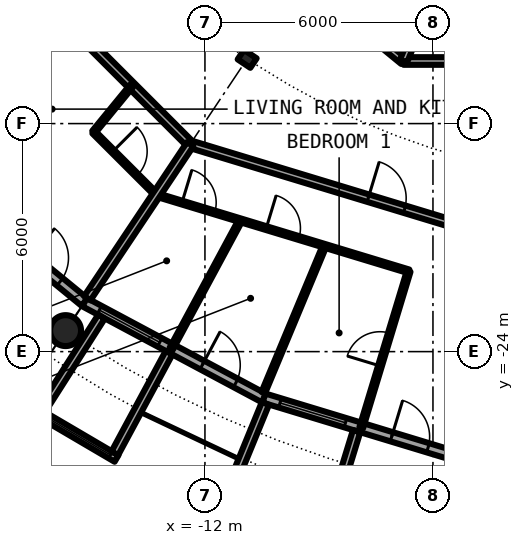
"""IFC4 building model, lengths in metres.
Left out: names, types, materials, properties, quantities, classifications, styles, units other than length and angle.
Written with IfcOpenShell. Run it as: python <this file> out.ifc"""

import sys

from ifc_helpers import new_model, si_unit, direction, frame, frame_2d, origin, origin_2d, place, context, subcontext, project, spatial, rectangle, circle, hollow_circle, i_section, extrude, element, fill, save


model = new_model("IFC4")
c1 = context("Model", 3, precision=1e-05, world=origin(), true_north=direction((0.0, 1.0)))
c2 = subcontext(c1, "Body", "Model", "MODEL_VIEW")
j1 = project(units=[si_unit("LENGTHUNIT", "METRE"), si_unit("PLANEANGLEUNIT", "RADIAN")], contexts=[c1])
p1 = place(None, origin())
s1 = spatial("IfcSite", under=j1, at=p1, CompositionType="ELEMENT")
p2 = place(p1, origin())
s2 = spatial("IfcBuilding", under=s1, at=p2, CompositionType="ELEMENT")
p3 = place(p2, frame((0.0, 0.0, 199.35)))
s3 = spatial("IfcBuildingStorey", under=s2, at=p3, CompositionType="ELEMENT", Elevation=199.35)
p4 = place(p3, frame((-15.667, -23.448, 0.0), z_axis=(0.0, 0.0, 1.0), x_axis=(1.0, 0.0, 0.0)))
e1 = element("IfcColumn", 1, at=p4, inside=s3, PredefinedType="COLUMN", context=c2, shape_type="SweptSolid", body=[
    extrude(hollow_circle(Radius=0.406, WallThickness=0.03, at=origin_2d()), origin(), (0.0, 0.0, 1.0), 3.05),
])
p5 = place(p3, frame((-10.889, -16.297, 0.0), z_axis=(0.0, 0.0, 1.0), x_axis=(-0.55557023302, -0.831469612303, 0.0)))
e2 = element("IfcColumn", 2, at=p5, inside=s3, PredefinedType="COLUMN", context=c2, shape_type="SweptSolid", body=[
    extrude(i_section(OverallWidth=0.3, OverallDepth=0.4, WebThickness=0.013, FlangeThickness=0.024, FilletRadius=0.027, at=origin_2d()), origin(), (0.0, 0.0, 1.0), 3.05),
])
p6 = place(p3, frame((-19.304, -19.304, 0.0), z_axis=(0.0, 0.0, 1.0), x_axis=(0.773019449054, -0.634382322723, 0.0)))
e3 = element("IfcWall", 3, at=p6, inside=s3, PredefinedType="SOLIDWALL", context=c2, shape_type="SweptSolid", body=[
    extrude(rectangle(XDim=5.352, YDim=0.25, at=frame_2d((2.676, 0.0))), origin(), (0.0, 0.0, 1.0), 2.7),
])
p7 = place(p6, frame((0.441, 0.0, 0.3)))
e4 = element("IfcOpeningElement", 4, at=p7, cuts=e3, PredefinedType="OPENING", context=c2, shape_type="SweptSolid", body=[
    extrude(rectangle(XDim=1.8, YDim=2.1, at=frame_2d((0.9, 1.05))), frame((0.0, 0.135, 0.0), z_axis=(0.0, -1.0, 0.0), x_axis=(1.0, 0.0, 0.0)), (0.0, 0.0, 1.0), 0.27),
])
p8 = place(p6, frame((3.51, 0.0, 0.0)))
e5 = element("IfcOpeningElement", 5, at=p8, cuts=e3, PredefinedType="OPENING", context=c2, shape_type="SweptSolid", body=[
    extrude(rectangle(XDim=1.0, YDim=2.2, at=frame_2d((0.5, 1.1))), frame((0.0, 0.135, 0.0), z_axis=(0.0, -1.0, 0.0), x_axis=(1.0, 0.0, 0.0)), (0.0, 0.0, 1.0), 0.27),
])
p9 = place(p3, frame((-15.167, -22.699, 0.0), z_axis=(0.0, 0.0, 1.0), x_axis=(0.881915646801, -0.471407246368, 0.0)))
e6 = element("IfcWall", 6, at=p9, inside=s3, PredefinedType="SOLIDWALL", context=c2, shape_type="SweptSolid", body=[
    extrude(rectangle(XDim=5.352, YDim=0.25, at=frame_2d((2.676, 0.0))), origin(), (0.0, 0.0, 1.0), 2.7),
])
p10 = place(p9, frame((0.441, 0.0, 0.3)))
e7 = element("IfcOpeningElement", 7, at=p10, cuts=e6, PredefinedType="OPENING", context=c2, shape_type="SweptSolid", body=[
    extrude(rectangle(XDim=1.8, YDim=2.1, at=frame_2d((0.9, 1.05))), frame((0.0, 0.135, 0.0), z_axis=(0.0, -1.0, 0.0), x_axis=(1.0, 0.0, 0.0)), (0.0, 0.0, 1.0), 0.27),
])
p11 = place(p9, frame((3.51, 0.0, 0.0)))
e8 = element("IfcOpeningElement", 8, at=p11, cuts=e6, PredefinedType="OPENING", context=c2, shape_type="SweptSolid", body=[
    extrude(rectangle(XDim=1.0, YDim=2.2, at=frame_2d((0.5, 1.1))), frame((0.0, 0.135, 0.0), z_axis=(0.0, -1.0, 0.0), x_axis=(1.0, 0.0, 0.0)), (0.0, 0.0, 1.0), 0.27),
])
p12 = place(p3, frame((-16.436, -25.574, -0.03), z_axis=(0.0, 0.0, 1.0), x_axis=(0.862403467503, -0.506221551535, 0.0)))
e9 = element("IfcWall", 9, at=p12, inside=s3, PredefinedType="SOLIDWALL", context=c2, shape_type="SweptSolid", body=[
    extrude(rectangle(XDim=2.446, YDim=0.2, at=frame_2d((1.223, 0.0))), origin(), (0.0, 0.0, 1.0), 2.73),
])
p13 = place(p12, frame((0.183, 0.0, 0.33)))
e10 = element("IfcOpeningElement", 10, at=p13, cuts=e9, PredefinedType="OPENING", context=c2, shape_type="SweptSolid", body=[
    extrude(circle(Radius=1.04, at=frame_2d((1.04, 1.04))), frame((0.0, 0.11, 0.0), z_axis=(0.0, -1.0, 0.0), x_axis=(1.0, 0.0, 0.0)), (0.0, 0.0, 1.0), 0.22),
])
p14 = place(p3, frame((-14.722, -23.079, -0.03), z_axis=(0.0, 0.0, 1.0), x_axis=(-0.537572179146, -0.843217737129, 0.0)))
e11 = element("IfcWall", 11, at=p14, inside=s3, PredefinedType="SOLIDWALL", context=c2, shape_type="SweptSolid", body=[
    extrude(rectangle(XDim=2.924, YDim=0.2, at=frame_2d((1.462, 0.0))), origin(), (0.0, 0.0, 1.0), 2.73),
])
p15 = place(p3, frame((-12.945, -24.029, -0.03), z_axis=(0.0, 0.0, 1.0), x_axis=(-0.474424310775, -0.88029629861, 0.0)))
e12 = element("IfcWall", 12, at=p15, inside=s3, PredefinedType="SOLIDWALL", context=c2, shape_type="SweptSolid", body=[
    extrude(rectangle(XDim=3.006, YDim=0.2, at=frame_2d((1.503, 0.0))), origin(), (0.0, 0.0, 1.0), 2.73),
])
p16 = place(p3, frame((-10.447, -25.222, 0.0), z_axis=(0.0, 0.0, 1.0), x_axis=(0.956965678721, -0.290201119486, 0.0)))
e13 = element("IfcWall", 13, at=p16, inside=s3, PredefinedType="SOLIDWALL", context=c2, shape_type="SweptSolid", body=[
    extrude(rectangle(XDim=5.351, YDim=0.25, at=frame_2d((2.676, 0.0))), origin(), (0.0, 0.0, 1.0), 2.7),
])
p17 = place(p16, frame((0.441, 0.0, 0.3)))
e14 = element("IfcOpeningElement", 14, at=p17, cuts=e13, PredefinedType="OPENING", context=c2, shape_type="SweptSolid", body=[
    extrude(rectangle(XDim=1.8, YDim=2.1, at=frame_2d((0.9, 1.05))), frame((0.0, 0.135, 0.0), z_axis=(0.0, -1.0, 0.0), x_axis=(1.0, 0.0, 0.0)), (0.0, 0.0, 1.0), 0.27),
])
p18 = place(p16, frame((3.51, 0.0, 0.0)))
e15 = element("IfcOpeningElement", 15, at=p18, cuts=e13, PredefinedType="OPENING", context=c2, shape_type="SweptSolid", body=[
    extrude(rectangle(XDim=1.0, YDim=2.2, at=frame_2d((0.5, 1.1))), frame((0.0, 0.135, 0.0), z_axis=(0.0, -1.0, 0.0), x_axis=(1.0, 0.0, 0.0)), (0.0, 0.0, 1.0), 0.27),
])
p19 = place(p3, frame((-10.409, -25.364, -0.03), z_axis=(0.0, 0.0, 1.0), x_axis=(-0.379509886562, -0.925187681501, 0.0)))
e16 = element("IfcWall", 16, at=p19, inside=s3, PredefinedType="SOLIDWALL", context=c2, shape_type="SweptSolid", body=[
    extrude(rectangle(XDim=2.883, YDim=0.2, at=frame_2d((1.441, 0.0))), origin(), (0.0, 0.0, 1.0), 2.73),
])
p20 = place(p3, frame((-8.009, -26.092, -0.03), z_axis=(0.0, 0.0, 1.0), x_axis=(-0.293406695073, -0.955987715029, 0.0)))
e17 = element("IfcWall", 17, at=p20, inside=s3, PredefinedType="SOLIDWALL", context=c2, shape_type="SweptSolid", body=[
    extrude(rectangle(XDim=3.006, YDim=0.2, at=frame_2d((1.503, 0.0))), origin(), (0.0, 0.0, 1.0), 2.73),
])
p21 = place(p3, frame((-14.927, -18.224, 0.0), z_axis=(0.0, 0.0, 1.0), x_axis=(0.707316201218, -0.706897299114, 0.0)))
e18 = element("IfcWall", 18, at=p21, inside=s3, PredefinedType="PARTITIONING", context=c2, shape_type="SweptSolid", body=[
    extrude(rectangle(XDim=2.331, YDim=0.1, at=frame_2d((1.166, 0.0))), origin(), (0.0, 0.0, 1.0), 2.7),
])
p22 = place(p21, frame((0.716, 0.0, 0.0)))
e19 = element("IfcOpeningElement", 19, at=p22, cuts=e18, PredefinedType="OPENING", context=c2, shape_type="SweptSolid", body=[
    extrude(rectangle(XDim=0.9, YDim=2.3, at=frame_2d((0.45, 1.15))), frame((0.0, 0.06, 0.0), z_axis=(0.0, -1.0, 0.0), x_axis=(1.0, 0.0, 0.0)), (0.0, 0.0, 1.0), 0.12),
])
p23 = place(p3, frame((-13.279, -19.874, 0.0), z_axis=(0.0, 0.0, 1.0), x_axis=(0.956989789119, -0.290121601266, 0.0)))
e20 = element("IfcWall", 20, at=p23, inside=s3, PredefinedType="PARTITIONING", context=c2, shape_type="SweptSolid", body=[
    extrude(rectangle(XDim=6.942, YDim=0.1, at=frame_2d((3.471, 0.0))), origin(), (0.0, 0.0, 1.0), 2.7),
])
p24 = place(p23, frame((3.022, 0.0, 0.0)))
e21 = element("IfcOpeningElement", 21, at=p24, cuts=e20, PredefinedType="OPENING", context=c2, shape_type="SweptSolid", body=[
    extrude(rectangle(XDim=0.9, YDim=2.3, at=frame_2d((0.45, 1.15))), frame((0.0, 0.06, 0.0), z_axis=(0.0, -1.0, 0.0), x_axis=(1.0, 0.0, 0.0)), (0.0, 0.0, 1.0), 0.12),
])
p25 = place(p23, frame((0.705, 0.0, 0.0)))
e22 = element("IfcOpeningElement", 22, at=p25, cuts=e20, PredefinedType="OPENING", context=c2, shape_type="SweptSolid", body=[
    extrude(rectangle(XDim=0.9, YDim=2.3, at=frame_2d((0.45, 1.15))), frame((0.0, 0.06, 0.0), z_axis=(0.0, -1.0, 0.0), x_axis=(1.0, 0.0, 0.0)), (0.0, 0.0, 1.0), 0.12),
])
p26 = place(p3, frame((-18.542, -12.389, 0.0), z_axis=(0.0, 0.0, 1.0), x_axis=(0.707106781187, -0.707106781187, 0.0)))
e23 = element("IfcWall", 23, at=p26, inside=s3, PredefinedType="PARTITIONING", context=c2, shape_type="SweptSolid", body=[
    extrude(rectangle(XDim=8.702, YDim=0.2, at=frame_2d((4.351, 0.0))), origin(), (0.0, 0.0, 1.0), 2.7),
])
p27 = place(p26, frame((2.763, 0.0, 0.0)))
e24 = element("IfcOpeningElement", 24, at=p27, cuts=e23, PredefinedType="OPENING", context=c2, shape_type="SweptSolid", body=[
    extrude(rectangle(XDim=1.0, YDim=2.3, at=frame_2d((0.5, 1.15))), frame((0.0, 0.11, 0.0), z_axis=(0.0, -1.0, 0.0), x_axis=(1.0, 0.0, 0.0)), (0.0, 0.0, 1.0), 0.22),
])
p28 = place(p3, frame((-12.389, -18.542, 0.0), z_axis=(0.0, 0.0, 1.0), x_axis=(0.956942051091, -0.290279022415, 0.0)))
e25 = element("IfcWall", 25, at=p28, inside=s3, PredefinedType="PARTITIONING", context=c2, shape_type="SweptSolid", body=[
    extrude(rectangle(XDim=12.946, YDim=0.2, at=frame_2d((6.473, 0.0))), origin(), (0.0, 0.0, 1.0), 2.7),
])
p29 = place(p28, frame((4.895, 0.0, 0.0)))
e26 = element("IfcOpeningElement", 26, at=p29, cuts=e25, PredefinedType="OPENING", context=c2, shape_type="SweptSolid", body=[
    extrude(rectangle(XDim=1.0, YDim=2.3, at=frame_2d((0.5, 1.15))), frame((0.0, 0.11, 0.0), z_axis=(0.0, -1.0, 0.0), x_axis=(1.0, 0.0, 0.0)), (0.0, 0.0, 1.0), 0.22),
])
p30 = place(p3, frame((-14.717, -9.834, 0.0), z_axis=(0.0, 0.0, 1.0), x_axis=(0.773034536097, -0.634363938131, 0.0)))
e27 = element("IfcWall", 27, at=p30, inside=s3, PredefinedType="PARTITIONING", context=c2, shape_type="SweptSolid", body=[
    extrude(rectangle(XDim=10.277, YDim=0.2, at=frame_2d((5.138, 0.0))), origin(), (0.0, 0.0, 1.0), 2.7),
])
p31 = place(p30, frame((4.638, 0.0, 0.0)))
e28 = element("IfcOpeningElement", 28, at=p31, cuts=e27, PredefinedType="OPENING", context=c2, shape_type="SweptSolid", body=[
    extrude(rectangle(XDim=1.0, YDim=2.3, at=frame_2d((0.5, 1.15))), frame((0.0, 0.11, 0.0), z_axis=(0.0, -1.0, 0.0), x_axis=(1.0, 0.0, 0.0)), (0.0, 0.0, 1.0), 0.22),
])
p32 = place(p3, frame((-6.773, -16.353, 0.0), z_axis=(0.0, 0.0, 1.0), x_axis=(1.0, 0.0, 0.0)))
e29 = element("IfcWall", 29, at=p32, inside=s3, PredefinedType="PARTITIONING", context=c2, shape_type="SweptSolid", body=[
    extrude(rectangle(XDim=13.546, YDim=0.2, at=frame_2d((6.773, 0.0))), origin(), (0.0, 0.0, 1.0), 2.7),
])
p33 = place(p32, frame((7.966, 0.0, 0.0)))
e30 = element("IfcOpeningElement", 30, at=p33, cuts=e29, PredefinedType="OPENING", context=c2, shape_type="SweptSolid", body=[
    extrude(rectangle(XDim=1.0, YDim=2.3, at=frame_2d((0.5, 1.15))), frame((0.0, 0.11, 0.0), z_axis=(0.0, -1.0, 0.0), x_axis=(1.0, 0.0, 0.0)), (0.0, 0.0, 1.0), 0.22),
])
p34 = place(p3, frame((-14.927, -18.224, 0.0), z_axis=(0.0, 0.0, 1.0), x_axis=(0.633861186344, 0.773446828454, 0.0)))
e31 = element("IfcWall", 31, at=p34, inside=s3, PredefinedType="PARTITIONING", context=c2, shape_type="SweptSolid", body=[
    extrude(rectangle(XDim=1.578, YDim=0.1, at=frame_2d((0.789, 0.0))), origin(), (0.0, 0.0, 1.0), 2.7),
])
p35 = place(p3, frame((-15.096, -22.596, 0.0), z_axis=(0.0, 0.0, 1.0), x_axis=(0.55555521993, 0.831479643532, 0.0)))
e32 = element("IfcWall", 32, at=p35, inside=s3, PredefinedType="PARTITIONING", context=c2, shape_type="SweptSolid", body=[
    extrude(rectangle(XDim=4.875, YDim=0.2, at=frame_2d((2.437, 0.0))), origin(), (0.0, 0.0, 1.0), 2.7),
])
p36 = place(p3, frame((-12.887, -23.925, 0.0), z_axis=(0.0, 0.0, 1.0), x_axis=(0.474281720599, 0.88037313084, 0.0)))
e33 = element("IfcWall", 33, at=p36, inside=s3, PredefinedType="PARTITIONING", context=c2, shape_type="SweptSolid", body=[
    extrude(rectangle(XDim=3.842, YDim=0.1, at=frame_2d((1.921, 0.0))), origin(), (0.0, 0.0, 1.0), 2.7),
])
p37 = place(p3, frame((-10.465, -25.079, 0.0), z_axis=(0.0, 0.0, 1.0), x_axis=(0.385232176411, 0.922819684585, 0.0)))
e34 = element("IfcWall", 34, at=p37, inside=s3, PredefinedType="PARTITIONING", context=c2, shape_type="SweptSolid", body=[
    extrude(rectangle(XDim=4.187, YDim=0.1, at=frame_2d((2.094, 0.0))), origin(), (0.0, 0.0, 1.0), 2.7),
])
p38 = place(p3, frame((-7.888, -26.005, 0.0), z_axis=(0.0, 0.0, 1.0), x_axis=(0.290193157742, 0.956968093094, 0.0)))
e35 = element("IfcWall", 35, at=p38, inside=s3, PredefinedType="PARTITIONING", context=c2, shape_type="SweptSolid", body=[
    extrude(rectangle(XDim=4.304, YDim=0.1, at=frame_2d((2.152, 0.0))), origin(), (0.0, 0.0, 1.0), 2.7),
])
p39 = place(p38, frame((1.702, 0.0, 0.0)))
e36 = element("IfcOpeningElement", 36, at=p39, cuts=e35, PredefinedType="OPENING", context=c2, shape_type="SweptSolid", body=[
    extrude(rectangle(XDim=0.9, YDim=2.3, at=frame_2d((0.45, 1.15))), frame((0.0, 0.06, 0.0), z_axis=(0.0, -1.0, 0.0), x_axis=(1.0, 0.0, 0.0)), (0.0, 0.0, 1.0), 0.12),
])
p40 = place(p3, frame((-6.774, -16.353, 0.0), z_axis=(0.0, 0.0, 1.0), x_axis=(0.382716169203, 0.92386597179, 0.0)))
e37 = element("IfcWall", 37, at=p40, inside=s3, PredefinedType="PARTITIONING", context=c2, shape_type="SweptSolid", body=[
    extrude(rectangle(XDim=9.981, YDim=0.2, at=frame_2d((4.99, 0.0))), origin(), (0.0, 0.0, 1.0), 2.7),
])
p41 = place(p8, origin())
e38 = element("IfcDoor", 38, at=p41, inside=s3, OperationType="SINGLE_SWING_LEFT", PredefinedType="DOOR", context=c2, shape_type="SweptSolid", body=[
    extrude(rectangle(XDim=1.0, YDim=2.2, at=frame_2d((0.5, 1.1))), frame((0.0, 0.025, 0.0), z_axis=(0.0, -1.0, 0.0), x_axis=(1.0, 0.0, 0.0)), (0.0, 0.0, 1.0), 0.05),
])
fill(e5, e38)
p42 = place(p10, origin())
e39 = element("IfcWindow", 39, at=p42, inside=s3, PartitioningType="SINGLE_PANEL", PredefinedType="WINDOW", context=c2, shape_type="SweptSolid", body=[
    extrude(rectangle(XDim=1.8, YDim=2.1, at=frame_2d((0.9, 1.05))), frame((0.0, 0.03, 0.0), z_axis=(0.0, -1.0, 0.0), x_axis=(1.0, 0.0, 0.0)), (0.0, 0.0, 1.0), 0.06),
])
fill(e7, e39)
p43 = place(p13, origin())
e40 = element("IfcWindow", 40, at=p43, inside=s3, PartitioningType="SINGLE_PANEL", PredefinedType="WINDOW", context=c2, shape_type="SweptSolid", body=[
    extrude(circle(Radius=1.04, at=frame_2d((1.04, 1.04))), frame((0.0, 0.03, 0.0), z_axis=(0.0, -1.0, 0.0), x_axis=(1.0, 0.0, 0.0)), (0.0, 0.0, 1.0), 0.06),
])
fill(e10, e40)
p44 = place(p11, origin())
e41 = element("IfcDoor", 41, at=p44, inside=s3, OperationType="SINGLE_SWING_LEFT", PredefinedType="DOOR", context=c2, shape_type="SweptSolid", body=[
    extrude(rectangle(XDim=1.0, YDim=2.2, at=frame_2d((0.5, 1.1))), frame((0.0, 0.025, 0.0), z_axis=(0.0, -1.0, 0.0), x_axis=(1.0, 0.0, 0.0)), (0.0, 0.0, 1.0), 0.05),
])
fill(e8, e41)
p45 = place(p17, origin())
e42 = element("IfcWindow", 42, at=p45, inside=s3, PartitioningType="SINGLE_PANEL", PredefinedType="WINDOW", context=c2, shape_type="SweptSolid", body=[
    extrude(rectangle(XDim=1.8, YDim=2.1, at=frame_2d((0.9, 1.05))), frame((0.0, 0.03, 0.0), z_axis=(0.0, -1.0, 0.0), x_axis=(1.0, 0.0, 0.0)), (0.0, 0.0, 1.0), 0.06),
])
fill(e14, e42)
p46 = place(p18, origin())
e43 = element("IfcDoor", 43, at=p46, inside=s3, OperationType="SINGLE_SWING_LEFT", PredefinedType="DOOR", context=c2, shape_type="SweptSolid", body=[
    extrude(rectangle(XDim=1.0, YDim=2.2, at=frame_2d((0.5, 1.1))), frame((0.0, 0.025, 0.0), z_axis=(0.0, -1.0, 0.0), x_axis=(1.0, 0.0, 0.0)), (0.0, 0.0, 1.0), 0.05),
])
fill(e15, e43)
p47 = place(p22, origin())
e44 = element("IfcDoor", 44, at=p47, inside=s3, OperationType="SINGLE_SWING_LEFT", PredefinedType="DOOR", context=c2, shape_type="SweptSolid", body=[
    extrude(rectangle(XDim=0.9, YDim=2.3, at=frame_2d((0.45, 1.15))), frame((0.0, 0.025, 0.0), z_axis=(0.0, -1.0, 0.0), x_axis=(1.0, 0.0, 0.0)), (0.0, 0.0, 1.0), 0.05),
])
fill(e19, e44)
p48 = place(p29, origin())
e45 = element("IfcDoor", 45, at=p48, inside=s3, OperationType="SINGLE_SWING_LEFT", PredefinedType="DOOR", context=c2, shape_type="SweptSolid", body=[
    extrude(rectangle(XDim=1.0, YDim=2.3, at=frame_2d((0.5, 1.15))), frame((0.0, 0.025, 0.0), z_axis=(0.0, -1.0, 0.0), x_axis=(1.0, 0.0, 0.0)), (0.0, 0.0, 1.0), 0.05),
])
fill(e26, e45)
p49 = place(p39, origin())
e46 = element("IfcDoor", 46, at=p49, inside=s3, OperationType="SINGLE_SWING_LEFT", PredefinedType="DOOR", context=c2, shape_type="SweptSolid", body=[
    extrude(rectangle(XDim=0.9, YDim=2.3, at=frame_2d((0.45, 1.15))), frame((0.0, 0.025, 0.0), z_axis=(0.0, -1.0, 0.0), x_axis=(1.0, 0.0, 0.0)), (0.0, 0.0, 1.0), 0.05),
])
fill(e36, e46)
p50 = place(p24, origin())
e47 = element("IfcDoor", 47, at=p50, inside=s3, OperationType="SINGLE_SWING_RIGHT", PredefinedType="DOOR", context=c2, shape_type="SweptSolid", body=[
    extrude(rectangle(XDim=0.9, YDim=2.3, at=frame_2d((0.45, 1.15))), frame((0.0, 0.025, 0.0), z_axis=(0.0, -1.0, 0.0), x_axis=(1.0, 0.0, 0.0)), (0.0, 0.0, 1.0), 0.05),
])
fill(e21, e47)
p51 = place(p25, origin())
e48 = element("IfcDoor", 48, at=p51, inside=s3, OperationType="SINGLE_SWING_LEFT", PredefinedType="DOOR", context=c2, shape_type="SweptSolid", body=[
    extrude(rectangle(XDim=0.9, YDim=2.3, at=frame_2d((0.45, 1.15))), frame((0.0, 0.025, 0.0), z_axis=(0.0, -1.0, 0.0), x_axis=(1.0, 0.0, 0.0)), (0.0, 0.0, 1.0), 0.05),
])
fill(e22, e48)
save(model, sys.argv[1])
